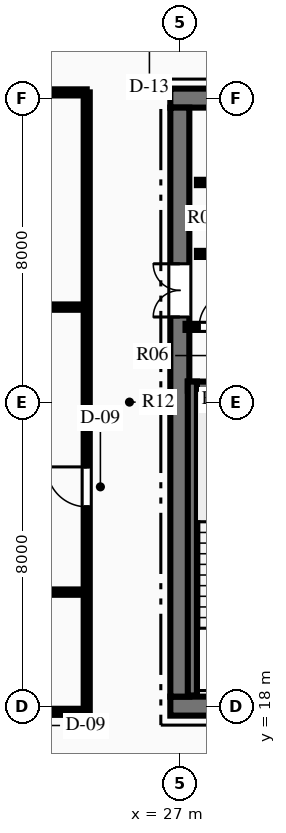
"""IFC4 building model, lengths in metres.
Left out: names, types, materials, properties, quantities, classifications, styles, units other than length and angle.
Written with IfcOpenShell. Run it as: python <this file> out.ifc"""

import sys

from ifc_helpers import new_model, si_unit, direction, frame, frame_2d, origin, place, context, subcontext, project, spatial, rectangle, extrude, element, fill, save


model = new_model("IFC4")
c1 = context("Model", 3, precision=1e-05, world=origin(), true_north=direction((0.0, 1.0)))
c2 = subcontext(c1, "Body", "Model", "MODEL_VIEW")
j1 = project(units=[si_unit("LENGTHUNIT", "METRE"), si_unit("PLANEANGLEUNIT", "RADIAN")], contexts=[c1])
p1 = place(None, origin())
s1 = spatial("IfcSite", under=j1, at=p1, CompositionType="ELEMENT")
p2 = place(p1, origin())
s2 = spatial("IfcBuilding", under=s1, at=p2, CompositionType="ELEMENT")
p3 = place(p2, frame((0.0, 0.0, 213.45)))
s3 = spatial("IfcBuildingStorey", under=s2, at=p3, CompositionType="ELEMENT", Elevation=213.45)
p4 = place(p3, frame((26.75, 18.0, 0.0), z_axis=(0.0, 0.0, 1.0), x_axis=(1.0, 0.0, 0.0)))
e1 = element("IfcWall", 1, at=p4, inside=s3, PredefinedType="SHEAR", context=c2, shape_type="SweptSolid", body=[
    extrude(rectangle(XDim=18.5, YDim=0.5, at=frame_2d((9.25, 0.0))), origin(), (0.0, 0.0, 1.0), 3.75),
])
p5 = place(p4, frame((7.35, 0.0, 0.0)))
e2 = element("IfcOpeningElement", 2, at=p5, cuts=e1, PredefinedType="OPENING", context=c2, shape_type="SweptSolid", body=[
    extrude(rectangle(XDim=1.1, YDim=2.15, at=frame_2d((0.55, 1.075))), frame((0.0, 0.26, 0.0), z_axis=(0.0, -1.0, 0.0), x_axis=(1.0, 0.0, 0.0)), (0.0, 0.0, 1.0), 0.52),
])
p6 = place(p4, frame((10.05, 0.0, 0.0)))
e3 = element("IfcOpeningElement", 3, at=p6, cuts=e1, PredefinedType="OPENING", context=c2, shape_type="SweptSolid", body=[
    extrude(rectangle(XDim=1.1, YDim=2.15, at=frame_2d((0.55, 1.075))), frame((0.0, 0.26, 0.0), z_axis=(0.0, -1.0, 0.0), x_axis=(1.0, 0.0, 0.0)), (0.0, 0.0, 1.0), 0.52),
])
p7 = place(p3, frame((26.75, 34.0, 0.0), z_axis=(0.0, 0.0, 1.0), x_axis=(1.0, 0.0, 0.0)))
e4 = element("IfcWall", 4, at=p7, inside=s3, PredefinedType="SHEAR", context=c2, shape_type="SweptSolid", body=[
    extrude(rectangle(XDim=18.5, YDim=0.5, at=frame_2d((9.25, 0.0))), origin(), (0.0, 0.0, 1.0), 3.75),
])
p8 = place(p7, frame((13.935, 0.0, 0.0)))
e5 = element("IfcOpeningElement", 5, at=p8, cuts=e4, PredefinedType="OPENING", context=c2, shape_type="SweptSolid", body=[
    extrude(rectangle(XDim=1.1, YDim=2.15, at=frame_2d((0.55, 1.075))), frame((0.0, 0.26, 0.0), z_axis=(0.0, -1.0, 0.0), x_axis=(1.0, 0.0, 0.0)), (0.0, 0.0, 1.0), 0.52),
])
p9 = place(p7, frame((16.185, 0.0, 0.0)))
e6 = element("IfcOpeningElement", 6, at=p9, cuts=e4, PredefinedType="OPENING", context=c2, shape_type="SweptSolid", body=[
    extrude(rectangle(XDim=1.1, YDim=2.15, at=frame_2d((0.55, 1.075))), frame((0.0, 0.26, 0.0), z_axis=(0.0, -1.0, 0.0), x_axis=(1.0, 0.0, 0.0)), (0.0, 0.0, 1.0), 0.52),
])
p10 = place(p3, frame((27.0, 18.25, 0.0), z_axis=(0.0, 0.0, 1.0), x_axis=(0.0, 1.0, 0.0)))
e7 = element("IfcWall", 7, at=p10, inside=s3, PredefinedType="SHEAR", context=c2, shape_type="SweptSolid", body=[
    extrude(rectangle(XDim=15.5, YDim=0.5, at=frame_2d((7.75, 0.0))), origin(), (0.0, 0.0, 1.0), 3.75),
])
p11 = place(p10, frame((9.99, 0.0, 0.0)))
e8 = element("IfcOpeningElement", 8, at=p11, cuts=e7, PredefinedType="OPENING", context=c2, shape_type="SweptSolid", body=[
    extrude(rectangle(XDim=1.4, YDim=2.2, at=frame_2d((0.7, 1.1))), frame((0.0, 0.26, 0.0), z_axis=(0.0, -1.0, 0.0), x_axis=(1.0, 0.0, 0.0)), (0.0, 0.0, 1.0), 0.52),
])
p12 = place(p3, frame((27.21, 26.42, 0.0), z_axis=(0.0, 0.0, 1.0), x_axis=(1.0, 0.0, 0.0)))
e9 = element("IfcWall", 9, at=p12, inside=s3, PredefinedType="SHEAR", context=c2, shape_type="SweptSolid", body=[
    extrude(rectangle(XDim=3.98, YDim=0.24, at=frame_2d((1.99, 0.0))), origin(), (0.0, 0.0, 1.0), 3.75),
])
p13 = place(p3, frame((27.33, 18.28, 0.0), z_axis=(0.0, 0.0, 1.0), x_axis=(0.0, 1.0, 0.0)))
e10 = element("IfcWall", 10, at=p13, inside=s3, PredefinedType="SHEAR", context=c2, shape_type="SweptSolid", body=[
    extrude(rectangle(XDim=8.26, YDim=0.24, at=frame_2d((4.13, 0.0))), origin(), (0.0, 0.0, 1.0), 3.75),
])
p14 = place(p3, frame((27.15, 27.98, 0.0), z_axis=(0.0, 0.0, 1.0), x_axis=(1.0, 0.0, 0.0)))
e11 = element("IfcWall", 11, at=p14, inside=s3, PredefinedType="PARTITIONING", context=c2, shape_type="SweptSolid", body=[
    extrude(rectangle(XDim=4.05, YDim=0.16, at=frame_2d((2.025, 0.0))), origin(), (0.0, 0.0, 1.0), 3.47),
])
p15 = place(p14, frame((0.36, 0.0, 0.0)))
e12 = element("IfcOpeningElement", 12, at=p15, cuts=e11, PredefinedType="OPENING", context=c2, shape_type="SweptSolid", body=[
    extrude(rectangle(XDim=0.9, YDim=2.15, at=frame_2d((0.45, 1.075))), frame((0.0, 0.09, 0.0), z_axis=(0.0, -1.0, 0.0), x_axis=(1.0, 0.0, 0.0)), (0.0, 0.0, 1.0), 0.18),
])
p16 = place(p14, frame((1.63, 0.0, 0.0)))
e13 = element("IfcOpeningElement", 13, at=p16, cuts=e11, PredefinedType="OPENING", context=c2, shape_type="SweptSolid", body=[
    extrude(rectangle(XDim=0.9, YDim=2.15, at=frame_2d((0.45, 1.075))), frame((0.0, 0.09, 0.0), z_axis=(0.0, -1.0, 0.0), x_axis=(1.0, 0.0, 0.0)), (0.0, 0.0, 1.0), 0.18),
])
p17 = place(p14, frame((2.788, 0.0, 0.0)))
e14 = element("IfcOpeningElement", 14, at=p17, cuts=e11, PredefinedType="OPENING", context=c2, shape_type="SweptSolid", body=[
    extrude(rectangle(XDim=0.9, YDim=2.15, at=frame_2d((0.45, 1.075))), frame((0.0, 0.09, 0.0), z_axis=(0.0, -1.0, 0.0), x_axis=(1.0, 0.0, 0.0)), (0.0, 0.0, 1.0), 0.18),
])
p18 = place(p3, frame((27.45, 29.9, 0.0), z_axis=(0.0, 0.0, 1.0), x_axis=(1.0, 0.0, 0.0)))
e15 = element("IfcWall", 15, at=p18, inside=s3, PredefinedType="PARTITIONING", context=c2, shape_type="SweptSolid", body=[
    extrude(rectangle(XDim=4.43, YDim=0.16, at=frame_2d((2.215, 0.0))), origin(), (0.0, 0.0, 1.0), 3.47),
])
p19 = place(p18, frame((1.675, 0.0, 0.0)))
e16 = element("IfcOpeningElement", 16, at=p19, cuts=e15, PredefinedType="OPENING", context=c2, shape_type="SweptSolid", body=[
    extrude(rectangle(XDim=0.95, YDim=2.15, at=frame_2d((0.475, 1.075))), frame((0.0, 0.09, 0.0), z_axis=(0.0, -1.0, 0.0), x_axis=(1.0, 0.0, 0.0)), (0.0, 0.0, 1.0), 0.18),
])
p20 = place(p3, frame((27.45, 31.78, 0.0), z_axis=(0.0, 0.0, 1.0), x_axis=(1.0, 0.0, 0.0)))
e17 = element("IfcWall", 17, at=p20, inside=s3, PredefinedType="PARTITIONING", context=c2, shape_type="SweptSolid", body=[
    extrude(rectangle(XDim=4.35, YDim=0.14, at=frame_2d((2.175, 0.0))), origin(), (0.0, 0.0, 1.0), 3.47),
])
p21 = place(p20, frame((1.7, 0.0, 0.0)))
e18 = element("IfcOpeningElement", 18, at=p21, cuts=e17, PredefinedType="OPENING", context=c2, shape_type="SweptSolid", body=[
    extrude(rectangle(XDim=0.9, YDim=2.15, at=frame_2d((0.45, 1.075))), frame((0.0, 0.08, 0.0), z_axis=(0.0, -1.0, 0.0), x_axis=(1.0, 0.0, 0.0)), (0.0, 0.0, 1.0), 0.16),
])
p22 = place(p3, frame((18.2, 17.85, 0.0), z_axis=(0.0, 0.0, 1.0), x_axis=(1.0, 0.0, 0.0)))
e19 = element("IfcWall", 19, at=p22, inside=s3, PredefinedType="PARTITIONING", context=c2, shape_type="SweptSolid", body=[
    extrude(rectangle(XDim=6.35, YDim=0.16, at=frame_2d((3.175, 0.0))), origin(), (0.0, 0.0, 1.0), 3.47),
])
p23 = place(p22, frame((3.793, 0.0, 0.0)))
e20 = element("IfcOpeningElement", 20, at=p23, cuts=e19, PredefinedType="OPENING", context=c2, shape_type="SweptSolid", body=[
    extrude(rectangle(XDim=1.05, YDim=2.15, at=frame_2d((0.525, 1.075))), frame((0.0, 0.09, 0.0), z_axis=(0.0, -1.0, 0.0), x_axis=(1.0, 0.0, 0.0)), (0.0, 0.0, 1.0), 0.18),
])
p24 = place(p3, frame((18.2, 34.15, 0.0), z_axis=(0.0, 0.0, 1.0), x_axis=(1.0, 0.0, 0.0)))
e21 = element("IfcWall", 21, at=p24, inside=s3, PredefinedType="PARTITIONING", context=c2, shape_type="SweptSolid", body=[
    extrude(rectangle(XDim=6.35, YDim=0.16, at=frame_2d((3.175, 0.0))), origin(), (0.0, 0.0, 1.0), 3.47),
])
p25 = place(p24, frame((3.793, 0.0, 0.0)))
e22 = element("IfcOpeningElement", 22, at=p25, cuts=e21, PredefinedType="OPENING", context=c2, shape_type="SweptSolid", body=[
    extrude(rectangle(XDim=1.05, YDim=2.15, at=frame_2d((0.525, 1.075))), frame((0.0, 0.09, 0.0), z_axis=(0.0, -1.0, 0.0), x_axis=(1.0, 0.0, 0.0)), (0.0, 0.0, 1.0), 0.18),
])
p26 = place(p3, frame((24.55, 17.85, 0.0), z_axis=(0.0, 0.0, 1.0), x_axis=(0.0, 1.0, 0.0)))
e23 = element("IfcWall", 23, at=p26, inside=s3, PredefinedType="PARTITIONING", context=c2, shape_type="SweptSolid", body=[
    extrude(rectangle(XDim=16.3, YDim=0.16, at=frame_2d((8.15, 0.0))), origin(), (0.0, 0.0, 1.0), 3.47),
])
p27 = place(p26, frame((5.395, 0.0, 0.0)))
e24 = element("IfcOpeningElement", 24, at=p27, cuts=e23, PredefinedType="OPENING", context=c2, shape_type="SweptSolid", body=[
    extrude(rectangle(XDim=1.05, YDim=2.15, at=frame_2d((0.525, 1.075))), frame((0.0, 0.09, 0.0), z_axis=(0.0, -1.0, 0.0), x_axis=(1.0, 0.0, 0.0)), (0.0, 0.0, 1.0), 0.18),
])
p28 = place(p3, frame((7.52, 21.0, 0.0), z_axis=(0.0, 0.0, 1.0), x_axis=(1.0, 0.0, 0.0)))
e25 = element("IfcWall", 25, at=p28, inside=s3, PredefinedType="PARTITIONING", context=c2, shape_type="SweptSolid", body=[
    extrude(rectangle(XDim=17.031, YDim=0.14, at=frame_2d((8.515, 0.0))), origin(), (0.0, 0.0, 1.0), 3.47),
])
p29 = place(p3, frame((10.142, 28.5, 0.0), z_axis=(0.0, 0.0, 1.0), x_axis=(1.0, 0.0, 0.0)))
e26 = element("IfcWall", 26, at=p29, inside=s3, PredefinedType="PARTITIONING", context=c2, shape_type="SweptSolid", body=[
    extrude(rectangle(XDim=14.408, YDim=0.14, at=frame_2d((7.204, 0.0))), origin(), (0.0, 0.0, 1.0), 3.47),
])
p30 = place(p15, origin())
e27 = element("IfcDoor", 27, at=p30, inside=s3, OperationType="SINGLE_SWING_RIGHT", PredefinedType="DOOR", context=c2, shape_type="SweptSolid", body=[
    extrude(rectangle(XDim=0.9, YDim=2.15, at=frame_2d((0.45, 1.075))), frame((0.0, 0.025, 0.0), z_axis=(0.0, -1.0, 0.0), x_axis=(1.0, 0.0, 0.0)), (0.0, 0.0, 1.0), 0.05),
])
fill(e12, e27)
p31 = place(p11, origin())
e28 = element("IfcDoor", 28, at=p31, inside=s3, OperationType="DOUBLE_DOOR_SINGLE_SWING", PredefinedType="DOOR", context=c2, shape_type="SweptSolid", body=[
    extrude(rectangle(XDim=1.4, YDim=2.2, at=frame_2d((0.7, 1.1))), frame((0.0, 0.025, 0.0), z_axis=(0.0, -1.0, 0.0), x_axis=(1.0, 0.0, 0.0)), (0.0, 0.0, 1.0), 0.05),
])
fill(e8, e28)
p32 = place(p27, origin())
e29 = element("IfcDoor", 29, at=p32, inside=s3, OperationType="SINGLE_SWING_RIGHT", PredefinedType="DOOR", context=c2, shape_type="SweptSolid", body=[
    extrude(rectangle(XDim=1.05, YDim=2.15, at=frame_2d((0.525, 1.075))), frame((0.0, 0.025, 0.0), z_axis=(0.0, -1.0, 0.0), x_axis=(1.0, 0.0, 0.0)), (0.0, 0.0, 1.0), 0.05),
])
fill(e24, e29)
save(model, sys.argv[1])
